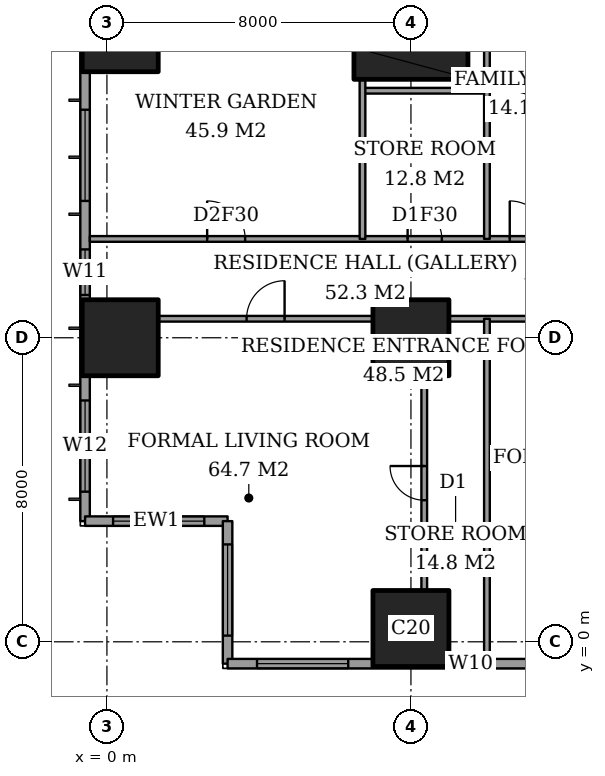
"""IFC4 building model, lengths in metres.
Left out: names, types, materials, properties, quantities, classifications, styles, units other than length and angle.
Written with IfcOpenShell. Run it as: python <this file> out.ifc"""

import sys

from ifc_helpers import new_model, si_unit, direction, frame, frame_2d, origin, origin_2d, place, context, subcontext, project, spatial, rectangle, extrude, element, fill, save


model = new_model("IFC4")
c1 = context("Model", 3, precision=1e-05, world=origin(), true_north=direction((0.0, 1.0)))
c2 = subcontext(c1, "Body", "Model", "MODEL_VIEW")
j1 = project(units=[si_unit("LENGTHUNIT", "METRE"), si_unit("PLANEANGLEUNIT", "RADIAN")], contexts=[c1])
p1 = place(None, origin())
s1 = spatial("IfcSite", under=j1, at=p1, CompositionType="ELEMENT")
p2 = place(p1, origin())
s2 = spatial("IfcBuilding", under=s1, at=p2, CompositionType="ELEMENT")
p3 = place(p2, frame((0.0, 0.0, 125.0)))
s3 = spatial("IfcBuildingStorey", under=s2, at=p3, CompositionType="ELEMENT", Elevation=125.0)
for number, where, z_axis, x_axis in (
    (1, (0.35, 8.0, 0.0), (0.0, 0.0, 1.0), (1.0, 0.0, 0.0)),
    (2, (0.35, 16.0, 0.0), (0.0, 0.0, 1.0), (1.0, 0.0, 0.0)),
    (3, (8.0, 0.35, 0.0), (0.0, 0.0, 1.0), (1.0, 0.0, 0.0)),
    (4, (8.0, 8.0, 0.0), (0.0, 0.0, 1.0), (1.0, 0.0, 0.0)),
):
    element("IfcColumn", number, at=place(p3, frame(where, z_axis=z_axis, x_axis=x_axis)), inside=s3, PredefinedType="COLUMN", context=c2, shape_type="SweptSolid", body=[
        extrude(rectangle(XDim=2.0, YDim=2.0, at=origin_2d()), origin(), (0.0, 0.0, 1.0), 3.6),
    ])
p4 = place(p3, frame((8.0, 16.0, 0.0), z_axis=(0.0, 0.0, 1.0), x_axis=(1.0, 0.0, 0.0)))
e5 = element("IfcColumn", 5, at=p4, inside=s3, PredefinedType="COLUMN", context=c2, shape_type="SweptSolid", body=[
    extrude(rectangle(XDim=3.0, YDim=2.4, at=origin_2d()), origin(), (0.0, 0.0, 1.0), 3.6),
])
p5 = place(p3, frame((-0.575, 44.825, 0.0), z_axis=(0.0, 0.0, 1.0), x_axis=(0.0, -1.0, 0.0)))
e6 = element("IfcWall", 6, at=p5, inside=s3, PredefinedType="SOLIDWALL", context=c2, shape_type="SweptSolid", body=[
    extrude(rectangle(XDim=41.65, YDim=0.25, at=frame_2d((20.825, 0.0))), origin(), (0.0, 0.0, 1.0), 3.6),
])
p6 = place(p5, frame((0.775, 0.0, 0.4)))
e7 = element("IfcOpeningElement", 7, at=p6, cuts=e6, PredefinedType="OPENING", context=c2, shape_type="SweptSolid", body=[
    extrude(rectangle(XDim=2.4, YDim=2.2, at=frame_2d((1.2, 1.1))), frame((0.0, 0.135, 0.0), z_axis=(0.0, -1.0, 0.0), x_axis=(1.0, 0.0, 0.0)), (0.0, 0.0, 1.0), 0.27),
])
p7 = place(p5, frame((6.2, 0.0, 0.4)))
e8 = element("IfcOpeningElement", 8, at=p7, cuts=e6, PredefinedType="OPENING", context=c2, shape_type="SweptSolid", body=[
    extrude(rectangle(XDim=1.2, YDim=2.2, at=frame_2d((0.6, 1.1))), frame((0.0, 0.135, 0.0), z_axis=(0.0, -1.0, 0.0), x_axis=(1.0, 0.0, 0.0)), (0.0, 0.0, 1.0), 0.27),
])
p8 = place(p5, frame((8.525, 0.0, 0.4)))
e9 = element("IfcOpeningElement", 9, at=p8, cuts=e6, PredefinedType="OPENING", context=c2, shape_type="SweptSolid", body=[
    extrude(rectangle(XDim=2.4, YDim=2.2, at=frame_2d((1.2, 1.1))), frame((0.0, 0.135, 0.0), z_axis=(0.0, -1.0, 0.0), x_axis=(1.0, 0.0, 0.0)), (0.0, 0.0, 1.0), 0.27),
])
p9 = place(p5, frame((15.625, 0.0, 0.4)))
e10 = element("IfcOpeningElement", 10, at=p9, cuts=e6, PredefinedType="OPENING", context=c2, shape_type="SweptSolid", body=[
    extrude(rectangle(XDim=2.4, YDim=2.2, at=frame_2d((1.2, 1.1))), frame((0.0, 0.135, 0.0), z_axis=(0.0, -1.0, 0.0), x_axis=(1.0, 0.0, 0.0)), (0.0, 0.0, 1.0), 0.27),
])
p10 = place(p5, frame((23.625, 0.0, 0.4)))
e11 = element("IfcOpeningElement", 11, at=p10, cuts=e6, PredefinedType="OPENING", context=c2, shape_type="SweptSolid", body=[
    extrude(rectangle(XDim=2.4, YDim=2.2, at=frame_2d((1.2, 1.1))), frame((0.0, 0.135, 0.0), z_axis=(0.0, -1.0, 0.0), x_axis=(1.0, 0.0, 0.0)), (0.0, 0.0, 1.0), 0.27),
])
p11 = place(p5, frame((30.825, 0.0, 0.4)))
e12 = element("IfcOpeningElement", 12, at=p11, cuts=e6, PredefinedType="OPENING", context=c2, shape_type="SweptSolid", body=[
    extrude(rectangle(XDim=2.4, YDim=2.2, at=frame_2d((1.2, 1.1))), frame((0.0, 0.135, 0.0), z_axis=(0.0, -1.0, 0.0), x_axis=(1.0, 0.0, 0.0)), (0.0, 0.0, 1.0), 0.27),
])
p12 = place(p5, frame((34.5, 0.0, 0.4)))
e13 = element("IfcOpeningElement", 13, at=p12, cuts=e6, PredefinedType="OPENING", context=c2, shape_type="SweptSolid", body=[
    extrude(rectangle(XDim=1.2, YDim=2.2, at=frame_2d((0.6, 1.1))), frame((0.0, 0.135, 0.0), z_axis=(0.0, -1.0, 0.0), x_axis=(1.0, 0.0, 0.0)), (0.0, 0.0, 1.0), 0.27),
])
p13 = place(p5, frame((38.475, 0.0, 0.4)))
e14 = element("IfcOpeningElement", 14, at=p13, cuts=e6, PredefinedType="OPENING", context=c2, shape_type="SweptSolid", body=[
    extrude(rectangle(XDim=2.4, YDim=2.2, at=frame_2d((1.2, 1.1))), frame((0.0, 0.135, 0.0), z_axis=(0.0, -1.0, 0.0), x_axis=(1.0, 0.0, 0.0)), (0.0, 0.0, 1.0), 0.27),
])
p14 = place(p3, frame((-0.575, 3.175, 0.0), z_axis=(0.0, 0.0, 1.0), x_axis=(1.0, 0.0, 0.0)))
e15 = element("IfcWall", 15, at=p14, inside=s3, PredefinedType="SOLIDWALL", context=c2, shape_type="SweptSolid", body=[
    extrude(rectangle(XDim=3.75, YDim=0.25, at=frame_2d((1.875, 0.0))), origin(), (0.0, 0.0, 1.0), 3.6),
])
p15 = place(p14, frame((0.738, 0.0, 0.4)))
e16 = element("IfcOpeningElement", 16, at=p15, cuts=e15, PredefinedType="OPENING", context=c2, shape_type="SweptSolid", body=[
    extrude(rectangle(XDim=2.4, YDim=2.2, at=frame_2d((1.2, 1.1))), frame((0.0, 0.135, 0.0), z_axis=(0.0, -1.0, 0.0), x_axis=(1.0, 0.0, 0.0)), (0.0, 0.0, 1.0), 0.27),
])
p16 = place(p3, frame((3.175, 3.175, 0.0), z_axis=(0.0, 0.0, 1.0), x_axis=(0.0, -1.0, 0.0)))
e17 = element("IfcWall", 17, at=p16, inside=s3, PredefinedType="SOLIDWALL", context=c2, shape_type="SweptSolid", body=[
    extrude(rectangle(XDim=3.75, YDim=0.25, at=frame_2d((1.875, 0.0))), origin(), (0.0, 0.0, 1.0), 3.6),
])
p17 = place(p16, frame((0.613, 0.0, 0.4)))
e18 = element("IfcOpeningElement", 18, at=p17, cuts=e17, PredefinedType="OPENING", context=c2, shape_type="SweptSolid", body=[
    extrude(rectangle(XDim=2.4, YDim=2.2, at=frame_2d((1.2, 1.1))), frame((0.0, 0.135, 0.0), z_axis=(0.0, -1.0, 0.0), x_axis=(1.0, 0.0, 0.0)), (0.0, 0.0, 1.0), 0.27),
])
p18 = place(p3, frame((3.175, -0.575, 0.0), z_axis=(0.0, 0.0, 1.0), x_axis=(1.0, 0.0, 0.0)))
e19 = element("IfcWall", 19, at=p18, inside=s3, PredefinedType="SOLIDWALL", context=c2, shape_type="SweptSolid", body=[
    extrude(rectangle(XDim=21.4, YDim=0.25, at=frame_2d((10.7, 0.0))), origin(), (0.0, 0.0, 1.0), 3.6),
])
p19 = place(p18, frame((0.775, 0.0, 0.4)))
e20 = element("IfcOpeningElement", 20, at=p19, cuts=e19, PredefinedType="OPENING", context=c2, shape_type="SweptSolid", body=[
    extrude(rectangle(XDim=2.4, YDim=2.2, at=frame_2d((1.2, 1.1))), frame((0.0, 0.135, 0.0), z_axis=(0.0, -1.0, 0.0), x_axis=(1.0, 0.0, 0.0)), (0.0, 0.0, 1.0), 0.27),
])
p20 = place(p18, frame((6.1, 0.0, 0.4)))
e21 = element("IfcOpeningElement", 21, at=p20, cuts=e19, PredefinedType="OPENING", context=c2, shape_type="SweptSolid", body=[
    extrude(rectangle(XDim=0.6, YDim=2.2, at=frame_2d((0.3, 1.1))), frame((0.0, 0.135, 0.0), z_axis=(0.0, -1.0, 0.0), x_axis=(1.0, 0.0, 0.0)), (0.0, 0.0, 1.0), 0.27),
])
p21 = place(p18, frame((8.125, 0.0, 0.4)))
e22 = element("IfcOpeningElement", 22, at=p21, cuts=e19, PredefinedType="OPENING", context=c2, shape_type="SweptSolid", body=[
    extrude(rectangle(XDim=2.4, YDim=2.2, at=frame_2d((1.2, 1.1))), frame((0.0, 0.135, 0.0), z_axis=(0.0, -1.0, 0.0), x_axis=(1.0, 0.0, 0.0)), (0.0, 0.0, 1.0), 0.27),
])
p22 = place(p18, frame((14.575, 0.0, 0.4)))
e23 = element("IfcOpeningElement", 23, at=p22, cuts=e19, PredefinedType="OPENING", context=c2, shape_type="SweptSolid", body=[
    extrude(rectangle(XDim=1.2, YDim=2.2, at=frame_2d((0.6, 1.1))), frame((0.0, 0.135, 0.0), z_axis=(0.0, -1.0, 0.0), x_axis=(1.0, 0.0, 0.0)), (0.0, 0.0, 1.0), 0.27),
])
p23 = place(p18, frame((17.4, 0.0, 0.4)))
e24 = element("IfcOpeningElement", 24, at=p23, cuts=e19, PredefinedType="OPENING", context=c2, shape_type="SweptSolid", body=[
    extrude(rectangle(XDim=1.2, YDim=2.2, at=frame_2d((0.6, 1.1))), frame((0.0, 0.135, 0.0), z_axis=(0.0, -1.0, 0.0), x_axis=(1.0, 0.0, 0.0)), (0.0, 0.0, 1.0), 0.27),
])
p24 = place(p3, frame((1.35, 8.5, 0.0), z_axis=(0.0, 0.0, 1.0), x_axis=(1.0, 0.0, 0.0)))
e25 = element("IfcWall", 25, at=p24, inside=s3, PredefinedType="PARTITIONING", context=c2, shape_type="SweptSolid", body=[
    extrude(rectangle(XDim=5.65, YDim=0.15, at=frame_2d((2.825, 0.0))), origin(), (0.0, 0.0, 1.0), 3.35),
])
p25 = place(p24, frame((2.325, 0.0, 0.0)))
e26 = element("IfcOpeningElement", 26, at=p25, cuts=e25, PredefinedType="OPENING", context=c2, shape_type="SweptSolid", body=[
    extrude(rectangle(XDim=1.0, YDim=2.1, at=frame_2d((0.5, 1.05))), frame((0.0, 0.085, 0.0), z_axis=(0.0, -1.0, 0.0), x_axis=(1.0, 0.0, 0.0)), (0.0, 0.0, 1.0), 0.17),
])
p26 = place(p3, frame((9.0, 8.5, 0.0), z_axis=(0.0, 0.0, 1.0), x_axis=(1.0, 0.0, 0.0)))
e27 = element("IfcWall", 27, at=p26, inside=s3, PredefinedType="PARTITIONING", context=c2, shape_type="SweptSolid", body=[
    extrude(rectangle(XDim=6.0, YDim=0.15, at=frame_2d((3.0, 0.0))), origin(), (0.0, 0.0, 1.0), 3.35),
])
p27 = place(p26, frame((3.0, 0.0, 0.0)))
e28 = element("IfcOpeningElement", 28, at=p27, cuts=e27, PredefinedType="OPENING", context=c2, shape_type="SweptSolid", body=[
    extrude(rectangle(XDim=1.0, YDim=2.1, at=frame_2d((0.5, 1.05))), frame((0.0, 0.085, 0.0), z_axis=(0.0, -1.0, 0.0), x_axis=(1.0, 0.0, 0.0)), (0.0, 0.0, 1.0), 0.17),
])
p28 = place(p3, frame((-0.45, 10.6, 0.0), z_axis=(0.0, 0.0, 1.0), x_axis=(1.0, 0.0, 0.0)))
e29 = element("IfcWall", 29, at=p28, inside=s3, PredefinedType="PARTITIONING", context=c2, shape_type="SweptSolid", body=[
    extrude(rectangle(XDim=25.011, YDim=0.15, at=frame_2d((12.505, 0.0))), origin(), (0.0, 0.0, 1.0), 3.35),
])
p29 = place(p28, frame((13.25, 0.0, 0.0)))
e30 = element("IfcOpeningElement", 30, at=p29, cuts=e29, PredefinedType="OPENING", context=c2, shape_type="SweptSolid", body=[
    extrude(rectangle(XDim=1.0, YDim=2.1, at=frame_2d((0.5, 1.05))), frame((0.0, 0.085, 0.0), z_axis=(0.0, -1.0, 0.0), x_axis=(1.0, 0.0, 0.0)), (0.0, 0.0, 1.0), 0.17),
])
p30 = place(p28, frame((3.087, 0.0, 0.0)))
e31 = element("IfcOpeningElement", 31, at=p30, cuts=e29, PredefinedType="OPENING", context=c2, shape_type="SweptSolid", body=[
    extrude(rectangle(XDim=1.0, YDim=2.1, at=frame_2d((0.5, 1.05))), frame((0.0, 0.085, 0.0), z_axis=(0.0, -1.0, 0.0), x_axis=(1.0, 0.0, 0.0)), (0.0, 0.0, 1.0), 0.17),
])
p31 = place(p28, frame((8.363, 0.0, 0.0)))
e32 = element("IfcOpeningElement", 32, at=p31, cuts=e29, PredefinedType="OPENING", context=c2, shape_type="SweptSolid", body=[
    extrude(rectangle(XDim=0.9, YDim=2.1, at=frame_2d((0.45, 1.05))), frame((0.0, 0.085, 0.0), z_axis=(0.0, -1.0, 0.0), x_axis=(1.0, 0.0, 0.0)), (0.0, 0.0, 1.0), 0.17),
])
p32 = place(p28, frame((11.05, 0.0, 0.0)))
e33 = element("IfcOpeningElement", 33, at=p32, cuts=e29, PredefinedType="OPENING", context=c2, shape_type="SweptSolid", body=[
    extrude(rectangle(XDim=1.0, YDim=2.1, at=frame_2d((0.5, 1.05))), frame((0.0, 0.085, 0.0), z_axis=(0.0, -1.0, 0.0), x_axis=(1.0, 0.0, 0.0)), (0.0, 0.0, 1.0), 0.17),
])
p33 = place(p28, frame((16.15, 0.0, 0.0)))
e34 = element("IfcOpeningElement", 34, at=p33, cuts=e29, PredefinedType="OPENING", context=c2, shape_type="SweptSolid", body=[
    extrude(rectangle(XDim=1.0, YDim=2.1, at=frame_2d((0.5, 1.05))), frame((0.0, 0.085, 0.0), z_axis=(0.0, -1.0, 0.0), x_axis=(1.0, 0.0, 0.0)), (0.0, 0.0, 1.0), 0.17),
])
p34 = place(p28, frame((21.175, 0.0, 0.0)))
e35 = element("IfcOpeningElement", 35, at=p34, cuts=e29, PredefinedType="OPENING", context=c2, shape_type="SweptSolid", body=[
    extrude(rectangle(XDim=1.0, YDim=2.1, at=frame_2d((0.5, 1.05))), frame((0.0, 0.085, 0.0), z_axis=(0.0, -1.0, 0.0), x_axis=(1.0, 0.0, 0.0)), (0.0, 0.0, 1.0), 0.17),
])
p35 = place(p3, frame((6.725, 14.5, 0.0), z_axis=(0.0, 0.0, 1.0), x_axis=(1.0, 0.0, 0.0)))
e36 = element("IfcWall", 36, at=p35, inside=s3, PredefinedType="PARTITIONING", context=c2, shape_type="SweptSolid", body=[
    extrude(rectangle(XDim=3.275, YDim=0.15, at=frame_2d((1.637, 0.0))), origin(), (0.0, 0.0, 1.0), 3.35),
])
p36 = place(p3, frame((6.725, 10.6, 0.0), z_axis=(0.0, 0.0, 1.0), x_axis=(0.0, 1.0, 0.0)))
e37 = element("IfcWall", 37, at=p36, inside=s3, PredefinedType="PARTITIONING", context=c2, shape_type="SweptSolid", body=[
    extrude(rectangle(XDim=4.2, YDim=0.15, at=frame_2d((2.1, 0.0))), origin(), (0.0, 0.0, 1.0), 3.35),
])
p37 = place(p3, frame((8.35, 1.35, 0.0), z_axis=(0.0, 0.0, 1.0), x_axis=(0.0, 1.0, 0.0)))
e38 = element("IfcWall", 38, at=p37, inside=s3, PredefinedType="PARTITIONING", context=c2, shape_type="SweptSolid", body=[
    extrude(rectangle(XDim=5.65, YDim=0.15, at=frame_2d((2.825, 0.0))), origin(), (0.0, 0.0, 1.0), 3.35),
])
p38 = place(p37, frame((2.375, 0.0, 0.0)))
e39 = element("IfcOpeningElement", 39, at=p38, cuts=e38, PredefinedType="OPENING", context=c2, shape_type="SweptSolid", body=[
    extrude(rectangle(XDim=0.9, YDim=2.1, at=frame_2d((0.45, 1.05))), frame((0.0, 0.085, 0.0), z_axis=(0.0, -1.0, 0.0), x_axis=(1.0, 0.0, 0.0)), (0.0, 0.0, 1.0), 0.17),
])
p39 = place(p3, frame((10.0, -0.45, 0.0), z_axis=(0.0, 0.0, 1.0), x_axis=(0.0, 1.0, 0.0)))
e40 = element("IfcWall", 40, at=p39, inside=s3, PredefinedType="PARTITIONING", context=c2, shape_type="SweptSolid", body=[
    extrude(rectangle(XDim=8.95, YDim=0.15, at=frame_2d((4.475, 0.0))), origin(), (0.0, 0.0, 1.0), 3.35),
])
p40 = place(p3, frame((10.0, 10.6, 0.0), z_axis=(0.0, 0.0, 1.0), x_axis=(0.0, 1.0, 0.0)))
e41 = element("IfcWall", 41, at=p40, inside=s3, PredefinedType="PARTITIONING", context=c2, shape_type="SweptSolid", body=[
    extrude(rectangle(XDim=11.0, YDim=0.15, at=frame_2d((5.5, 0.0))), origin(), (0.0, 0.0, 1.0), 3.35),
])
p41 = place(p40, frame((8.2, 0.0, 0.0)))
e42 = element("IfcOpeningElement", 42, at=p41, cuts=e41, PredefinedType="OPENING", context=c2, shape_type="SweptSolid", body=[
    extrude(rectangle(XDim=1.0, YDim=2.1, at=frame_2d((0.5, 1.05))), frame((0.0, 0.085, 0.0), z_axis=(0.0, -1.0, 0.0), x_axis=(1.0, 0.0, 0.0)), (0.0, 0.0, 1.0), 0.17),
])
p42 = place(p11, origin())
e43 = element("IfcWindow", 43, at=p42, inside=s3, PartitioningType="SINGLE_PANEL", PredefinedType="WINDOW", context=c2, shape_type="SweptSolid", body=[
    extrude(rectangle(XDim=2.4, YDim=2.2, at=frame_2d((1.2, 1.1))), frame((0.0, 0.03, 0.0), z_axis=(0.0, -1.0, 0.0), x_axis=(1.0, 0.0, 0.0)), (0.0, 0.0, 1.0), 0.06),
])
fill(e12, e43)
p43 = place(p12, origin())
e44 = element("IfcWindow", 44, at=p43, inside=s3, PartitioningType="SINGLE_PANEL", PredefinedType="WINDOW", context=c2, shape_type="SweptSolid", body=[
    extrude(rectangle(XDim=1.2, YDim=2.2, at=frame_2d((0.6, 1.1))), frame((0.0, 0.03, 0.0), z_axis=(0.0, -1.0, 0.0), x_axis=(1.0, 0.0, 0.0)), (0.0, 0.0, 1.0), 0.06),
])
fill(e13, e44)
p44 = place(p13, origin())
e45 = element("IfcWindow", 45, at=p44, inside=s3, PartitioningType="SINGLE_PANEL", PredefinedType="WINDOW", context=c2, shape_type="SweptSolid", body=[
    extrude(rectangle(XDim=2.4, YDim=2.2, at=frame_2d((1.2, 1.1))), frame((0.0, 0.03, 0.0), z_axis=(0.0, -1.0, 0.0), x_axis=(1.0, 0.0, 0.0)), (0.0, 0.0, 1.0), 0.06),
])
fill(e14, e45)
p45 = place(p15, origin())
e46 = element("IfcWindow", 46, at=p45, inside=s3, PartitioningType="SINGLE_PANEL", PredefinedType="WINDOW", context=c2, shape_type="SweptSolid", body=[
    extrude(rectangle(XDim=2.4, YDim=2.2, at=frame_2d((1.2, 1.1))), frame((0.0, 0.03, 0.0), z_axis=(0.0, -1.0, 0.0), x_axis=(1.0, 0.0, 0.0)), (0.0, 0.0, 1.0), 0.06),
])
fill(e16, e46)
p46 = place(p17, origin())
e47 = element("IfcWindow", 47, at=p46, inside=s3, PartitioningType="SINGLE_PANEL", PredefinedType="WINDOW", context=c2, shape_type="SweptSolid", body=[
    extrude(rectangle(XDim=2.4, YDim=2.2, at=frame_2d((1.2, 1.1))), frame((0.0, 0.03, 0.0), z_axis=(0.0, -1.0, 0.0), x_axis=(1.0, 0.0, 0.0)), (0.0, 0.0, 1.0), 0.06),
])
fill(e18, e47)
p47 = place(p19, origin())
e48 = element("IfcWindow", 48, at=p47, inside=s3, PartitioningType="SINGLE_PANEL", PredefinedType="WINDOW", context=c2, shape_type="SweptSolid", body=[
    extrude(rectangle(XDim=2.4, YDim=2.2, at=frame_2d((1.2, 1.1))), frame((0.0, 0.03, 0.0), z_axis=(0.0, -1.0, 0.0), x_axis=(1.0, 0.0, 0.0)), (0.0, 0.0, 1.0), 0.06),
])
fill(e20, e48)
p48 = place(p20, origin())
e49 = element("IfcWindow", 49, at=p48, inside=s3, PartitioningType="SINGLE_PANEL", PredefinedType="WINDOW", context=c2, shape_type="SweptSolid", body=[
    extrude(rectangle(XDim=0.6, YDim=2.2, at=frame_2d((0.3, 1.1))), frame((0.0, 0.03, 0.0), z_axis=(0.0, -1.0, 0.0), x_axis=(1.0, 0.0, 0.0)), (0.0, 0.0, 1.0), 0.06),
])
fill(e21, e49)
p49 = place(p25, origin())
e50 = element("IfcDoor", 50, at=p49, inside=s3, OperationType="SINGLE_SWING_LEFT", PredefinedType="DOOR", context=c2, shape_type="SweptSolid", body=[
    extrude(rectangle(XDim=1.0, YDim=2.1, at=frame_2d((0.5, 1.05))), frame((0.0, 0.025, 0.0), z_axis=(0.0, -1.0, 0.0), x_axis=(1.0, 0.0, 0.0)), (0.0, 0.0, 1.0), 0.05),
])
fill(e26, e50)
p50 = place(p38, origin())
e51 = element("IfcDoor", 51, at=p50, inside=s3, OperationType="SINGLE_SWING_LEFT", PredefinedType="DOOR", context=c2, shape_type="SweptSolid", body=[
    extrude(rectangle(XDim=0.9, YDim=2.1, at=frame_2d((0.45, 1.05))), frame((0.0, 0.025, 0.0), z_axis=(0.0, -1.0, 0.0), x_axis=(1.0, 0.0, 0.0)), (0.0, 0.0, 1.0), 0.05),
])
fill(e39, e51)
p51 = place(p30, origin())
e52 = element("IfcDoor", 52, at=p51, inside=s3, OperationType="SINGLE_SWING_RIGHT", PredefinedType="DOOR", context=c2, shape_type="SweptSolid", body=[
    extrude(rectangle(XDim=1.0, YDim=2.1, at=frame_2d((0.5, 1.05))), frame((0.0, 0.025, 0.0), z_axis=(0.0, -1.0, 0.0), x_axis=(1.0, 0.0, 0.0)), (0.0, 0.0, 1.0), 0.05),
])
fill(e31, e52)
p52 = place(p31, origin())
e53 = element("IfcDoor", 53, at=p52, inside=s3, OperationType="SINGLE_SWING_RIGHT", PredefinedType="DOOR", context=c2, shape_type="SweptSolid", body=[
    extrude(rectangle(XDim=0.9, YDim=2.1, at=frame_2d((0.45, 1.05))), frame((0.0, 0.025, 0.0), z_axis=(0.0, -1.0, 0.0), x_axis=(1.0, 0.0, 0.0)), (0.0, 0.0, 1.0), 0.05),
])
fill(e32, e53)
p53 = place(p32, origin())
e54 = element("IfcDoor", 54, at=p53, inside=s3, OperationType="SINGLE_SWING_RIGHT", PredefinedType="DOOR", context=c2, shape_type="SweptSolid", body=[
    extrude(rectangle(XDim=1.0, YDim=2.1, at=frame_2d((0.5, 1.05))), frame((0.0, 0.025, 0.0), z_axis=(0.0, -1.0, 0.0), x_axis=(1.0, 0.0, 0.0)), (0.0, 0.0, 1.0), 0.05),
])
fill(e33, e54)
save(model, sys.argv[1])
